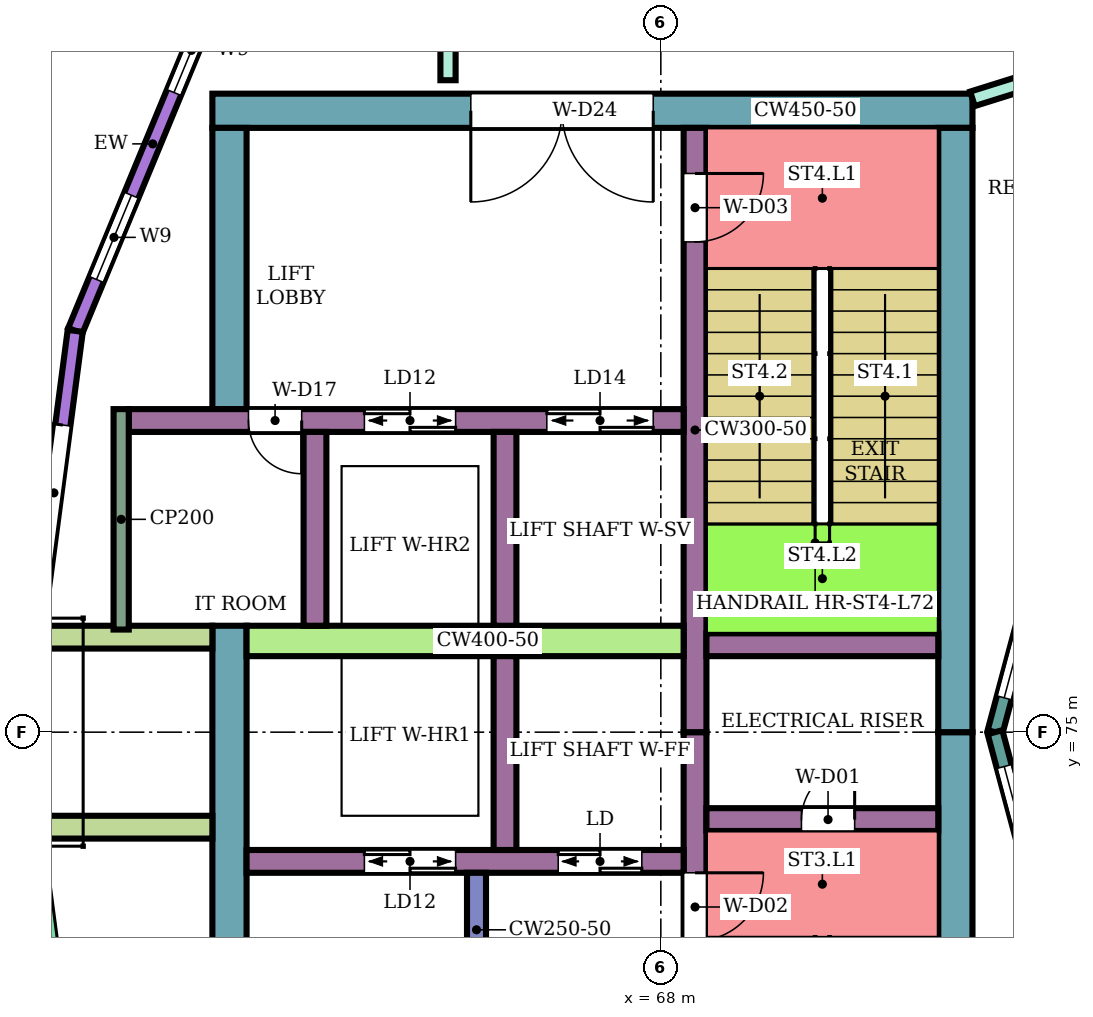
"""IFC4 building model, lengths in metres.
Left out: names, types, materials, properties, quantities, classifications, styles, units other than length and angle.
Written with IfcOpenShell. Run it as: python <this file> out.ifc"""

import sys

from ifc_helpers import new_model, si_unit, direction, frame, frame_2d, origin, place, context, subcontext, project, spatial, rectangle, extrude, element, fill, save


model = new_model("IFC4")
c1 = context("Model", 3, precision=1e-05, world=origin(), true_north=direction((0.0, 1.0)))
c2 = subcontext(c1, "Body", "Model", "MODEL_VIEW")
j1 = project(units=[si_unit("LENGTHUNIT", "METRE"), si_unit("PLANEANGLEUNIT", "RADIAN")], contexts=[c1])
p1 = place(None, origin())
s1 = spatial("IfcSite", under=j1, at=p1, CompositionType="ELEMENT")
p2 = place(p1, origin())
s2 = spatial("IfcBuilding", under=s1, at=p2, CompositionType="ELEMENT")
p3 = place(p2, frame((0.0, 0.0, 314.9)))
s3 = spatial("IfcBuildingStorey", under=s2, at=p3, CompositionType="ELEMENT", Elevation=314.9)
p4 = place(p3, frame((72.1, 83.175, 0.0), z_axis=(0.0, 0.0, 1.0), x_axis=(-1.0, 0.0, 0.0)))
e1 = element("IfcWall", 1, at=p4, inside=s3, PredefinedType="SHEAR", context=c2, shape_type="SweptSolid", body=[
    extrude(rectangle(XDim=10.0, YDim=0.45, at=frame_2d((5.0, 0.0))), origin(), (0.0, 0.0, 1.0), 4.08),
])
p5 = place(p4, frame((4.2, 0.0, 0.0)))
e2 = element("IfcOpeningElement", 2, at=p5, cuts=e1, PredefinedType="OPENING", context=c2, shape_type="SweptSolid", body=[
    extrude(rectangle(XDim=2.4, YDim=2.4, at=frame_2d((1.2, 1.2))), frame((0.0, 0.235, 0.0), z_axis=(0.0, -1.0, 0.0), x_axis=(1.0, 0.0, 0.0)), (0.0, 0.0, 1.0), 0.47),
])
for number, where, z_axis, x_axis in (
    (3, (71.875, 75.0, 0.0), (0.0, 0.0, 1.0), (0.0, -1.0, 0.0)),
    (4, (71.875, 82.95, 0.0), (0.0, 0.0, 1.0), (0.0, -1.0, 0.0)),
):
    element("IfcWall", number, at=place(p3, frame(where, z_axis=z_axis, x_axis=x_axis)), inside=s3, PredefinedType="SHEAR", context=c2, shape_type="SweptSolid", body=[
        extrude(rectangle(XDim=7.95, YDim=0.45, at=frame_2d((3.975, 0.0))), origin(), (0.0, 0.0, 1.0), 4.08),
    ])
p6 = place(p3, frame((62.325, 76.4, 0.0), z_axis=(0.0, 0.0, 1.0), x_axis=(0.0, -1.0, 0.0)))
e5 = element("IfcWall", 5, at=p6, inside=s3, PredefinedType="SHEAR", context=c2, shape_type="SweptSolid", body=[
    extrude(rectangle(XDim=9.35, YDim=0.45, at=frame_2d((4.675, 0.0))), origin(), (0.0, 0.0, 1.0), 4.08),
])
p7 = place(p3, frame((62.325, 82.95, 0.0), z_axis=(0.0, 0.0, 1.0), x_axis=(0.0, -1.0, 0.0)))
e6 = element("IfcWall", 6, at=p7, inside=s3, PredefinedType="SHEAR", context=c2, shape_type="SweptSolid", body=[
    extrude(rectangle(XDim=3.7, YDim=0.45, at=frame_2d((1.85, 0.0))), origin(), (0.0, 0.0, 1.0), 4.08),
])
p8 = place(p3, frame((68.45, 75.0, 0.0), z_axis=(0.0, 0.0, 1.0), x_axis=(0.0, -1.0, 0.0)))
e7 = element("IfcWall", 7, at=p8, inside=s3, PredefinedType="SHEAR", context=c2, shape_type="SweptSolid", body=[
    extrude(rectangle(XDim=7.95, YDim=0.3, at=frame_2d((3.975, 0.0))), origin(), (0.0, 0.0, 1.0), 4.08),
])
p9 = place(p8, frame((1.85, 0.0, 0.0)))
e8 = element("IfcOpeningElement", 8, at=p9, cuts=e7, PredefinedType="OPENING", context=c2, shape_type="SweptSolid", body=[
    extrude(rectangle(XDim=0.9, YDim=2.1, at=frame_2d((0.45, 1.05))), frame((0.0, 0.16, 0.0), z_axis=(0.0, -1.0, 0.0), x_axis=(1.0, 0.0, 0.0)), (0.0, 0.0, 1.0), 0.32),
])
p10 = place(p3, frame((68.45, 82.95, 0.0), z_axis=(0.0, 0.0, 1.0), x_axis=(0.0, -1.0, 0.0)))
e9 = element("IfcWall", 9, at=p10, inside=s3, PredefinedType="SHEAR", context=c2, shape_type="SweptSolid", body=[
    extrude(rectangle(XDim=7.95, YDim=0.3, at=frame_2d((3.975, 0.0))), origin(), (0.0, 0.0, 1.0), 4.08),
])
p11 = place(p10, frame((0.6, 0.0, 0.0)))
e10 = element("IfcOpeningElement", 10, at=p11, cuts=e9, PredefinedType="OPENING", context=c2, shape_type="SweptSolid", body=[
    extrude(rectangle(XDim=0.9, YDim=2.1, at=frame_2d((0.45, 1.05))), frame((0.0, 0.16, 0.0), z_axis=(0.0, -1.0, 0.0), x_axis=(1.0, 0.0, 0.0)), (0.0, 0.0, 1.0), 0.32),
])
p12 = place(p3, frame((71.65, 73.85, 0.0), z_axis=(0.0, 0.0, 1.0), x_axis=(-1.0, 0.0, 0.0)))
e11 = element("IfcWall", 11, at=p12, inside=s3, PredefinedType="SHEAR", context=c2, shape_type="SweptSolid", body=[
    extrude(rectangle(XDim=3.05, YDim=0.3, at=frame_2d((1.525, 0.0))), origin(), (0.0, 0.0, 1.0), 4.08),
])
p13 = place(p12, frame((1.1, 0.0, 0.0)))
e12 = element("IfcOpeningElement", 12, at=p13, cuts=e11, PredefinedType="OPENING", context=c2, shape_type="SweptSolid", body=[
    extrude(rectangle(XDim=0.7, YDim=2.0, at=frame_2d((0.35, 1.0))), frame((0.0, 0.16, 0.0), z_axis=(0.0, -1.0, 0.0), x_axis=(1.0, 0.0, 0.0)), (0.0, 0.0, 1.0), 0.32),
])
p14 = place(p3, frame((71.65, 76.15, 0.0), z_axis=(0.0, 0.0, 1.0), x_axis=(-1.0, 0.0, 0.0)))
e13 = element("IfcWall", 13, at=p14, inside=s3, PredefinedType="SHEAR", context=c2, shape_type="SweptSolid", body=[
    extrude(rectangle(XDim=3.05, YDim=0.3, at=frame_2d((1.525, 0.0))), origin(), (0.0, 0.0, 1.0), 4.08),
])
p15 = place(p3, frame((68.3, 73.3, 0.0), z_axis=(0.0, 0.0, 1.0), x_axis=(-1.0, 0.0, 0.0)))
e14 = element("IfcWall", 14, at=p15, inside=s3, PredefinedType="SHEAR", context=c2, shape_type="SweptSolid", body=[
    extrude(rectangle(XDim=5.75, YDim=0.3, at=frame_2d((2.875, 0.0))), origin(), (0.0, 0.0, 1.0), 4.08),
])
p16 = place(p15, frame((0.55, 0.0, 0.0)))
e15 = element("IfcOpeningElement", 15, at=p16, cuts=e14, PredefinedType="OPENING", context=c2, shape_type="SweptSolid", body=[
    extrude(rectangle(XDim=1.1, YDim=2.1, at=frame_2d((0.55, 1.05))), frame((0.0, 0.16, 0.0), z_axis=(0.0, -1.0, 0.0), x_axis=(1.0, 0.0, 0.0)), (0.0, 0.0, 1.0), 0.32),
])
p17 = place(p15, frame((3.0, 0.0, 0.0)))
e16 = element("IfcOpeningElement", 16, at=p17, cuts=e14, PredefinedType="OPENING", context=c2, shape_type="SweptSolid", body=[
    extrude(rectangle(XDim=1.2, YDim=2.1, at=frame_2d((0.6, 1.05))), frame((0.0, 0.16, 0.0), z_axis=(0.0, -1.0, 0.0), x_axis=(1.0, 0.0, 0.0)), (0.0, 0.0, 1.0), 0.32),
])
p18 = place(p3, frame((68.3, 76.2, 0.0), z_axis=(0.0, 0.0, 1.0), x_axis=(-1.0, 0.0, 0.0)))
e17 = element("IfcWall", 17, at=p18, inside=s3, PredefinedType="SHEAR", context=c2, shape_type="SweptSolid", body=[
    extrude(rectangle(XDim=5.75, YDim=0.4, at=frame_2d((2.875, 0.0))), origin(), (0.0, 0.0, 1.0), 4.08),
])
p19 = place(p3, frame((68.3, 79.1, 0.0), z_axis=(0.0, 0.0, 1.0), x_axis=(-1.0, 0.0, 0.0)))
e18 = element("IfcWall", 18, at=p19, inside=s3, PredefinedType="SHEAR", context=c2, shape_type="SweptSolid", body=[
    extrude(rectangle(XDim=7.3, YDim=0.3, at=frame_2d((3.65, 0.0))), origin(), (0.0, 0.0, 1.0), 4.08),
])
p20 = place(p19, frame((0.4, 0.0, 0.0)))
e19 = element("IfcOpeningElement", 19, at=p20, cuts=e18, PredefinedType="OPENING", context=c2, shape_type="SweptSolid", body=[
    extrude(rectangle(XDim=1.4, YDim=2.1, at=frame_2d((0.7, 1.05))), frame((0.0, 0.16, 0.0), z_axis=(0.0, -1.0, 0.0), x_axis=(1.0, 0.0, 0.0)), (0.0, 0.0, 1.0), 0.32),
])
p21 = place(p19, frame((3.0, 0.0, 0.0)))
e20 = element("IfcOpeningElement", 20, at=p21, cuts=e18, PredefinedType="OPENING", context=c2, shape_type="SweptSolid", body=[
    extrude(rectangle(XDim=1.2, YDim=2.1, at=frame_2d((0.6, 1.05))), frame((0.0, 0.16, 0.0), z_axis=(0.0, -1.0, 0.0), x_axis=(1.0, 0.0, 0.0)), (0.0, 0.0, 1.0), 0.32),
])
p22 = place(p19, frame((5.025, 0.0, 0.0)))
e21 = element("IfcOpeningElement", 21, at=p22, cuts=e18, PredefinedType="OPENING", context=c2, shape_type="SweptSolid", body=[
    extrude(rectangle(XDim=0.7, YDim=2.1, at=frame_2d((0.35, 1.05))), frame((0.0, 0.16, 0.0), z_axis=(0.0, -1.0, 0.0), x_axis=(1.0, 0.0, 0.0)), (0.0, 0.0, 1.0), 0.32),
])
for number, where, z_axis, x_axis in (
    (22, (65.95, 76.0, 0.0), (0.0, 0.0, 1.0), (0.0, -1.0, 0.0)),
    (23, (65.95, 78.95, 0.0), (0.0, 0.0, 1.0), (0.0, -1.0, 0.0)),
    (24, (63.45, 78.95, 0.0), (0.0, 0.0, 1.0), (0.0, -1.0, 0.0)),
):
    element("IfcWall", number, at=place(p3, frame(where, z_axis=z_axis, x_axis=x_axis)), inside=s3, PredefinedType="SHEAR", context=c2, shape_type="SweptSolid", body=[
        extrude(rectangle(XDim=2.55, YDim=0.3, at=frame_2d((1.275, 0.0))), origin(), (0.0, 0.0, 1.0), 4.08),
    ])
p23 = place(p3, frame((65.575, 73.15, 0.0), z_axis=(0.0, 0.0, 1.0), x_axis=(0.0, -1.0, 0.0)))
e25 = element("IfcWall", 25, at=p23, inside=s3, PredefinedType="SHEAR", context=c2, shape_type="SweptSolid", body=[
    extrude(rectangle(XDim=1.5, YDim=0.25, at=frame_2d((0.75, 0.0))), origin(), (0.0, 0.0, 1.0), 4.08),
])
p24 = place(p3, frame((62.334, 85.199, 0.0), z_axis=(0.0, 0.0, 1.0), x_axis=(-0.382690574388, -0.923876574156, 0.0)))
e26 = element("IfcWall", 26, at=p24, inside=s3, PredefinedType="NOTDEFINED", context=c2, shape_type="SweptSolid", body=[
    extrude(rectangle(XDim=5.325, YDim=0.2, at=frame_2d((2.663, 0.0))), origin(), (0.0, 0.0, 1.0), 4.4),
])
p25 = place(p24, frame((0.731, 0.0, 0.9)))
e27 = element("IfcOpeningElement", 27, at=p25, cuts=e26, PredefinedType="OPENING", context=c2, shape_type="SweptSolid", body=[
    extrude(rectangle(XDim=1.2, YDim=2.7, at=frame_2d((0.6, 1.35))), frame((0.0, 0.11, 0.0), z_axis=(0.0, -1.0, 0.0), x_axis=(1.0, 0.0, 0.0)), (0.0, 0.0, 1.0), 0.22),
])
p26 = place(p24, frame((3.394, 0.0, 0.9)))
e28 = element("IfcOpeningElement", 28, at=p26, cuts=e26, PredefinedType="OPENING", context=c2, shape_type="SweptSolid", body=[
    extrude(rectangle(XDim=1.2, YDim=2.7, at=frame_2d((0.6, 1.35))), frame((0.0, 0.11, 0.0), z_axis=(0.0, -1.0, 0.0), x_axis=(1.0, 0.0, 0.0)), (0.0, 0.0, 1.0), 0.22),
])
p27 = place(p3, frame((60.296, 80.28, 0.0), z_axis=(0.0, 0.0, 1.0), x_axis=(-0.130512609533, -0.991446649474, 0.0)))
e29 = element("IfcWall", 29, at=p27, inside=s3, PredefinedType="NOTDEFINED", context=c2, shape_type="SweptSolid", body=[
    extrude(rectangle(XDim=3.913, YDim=0.2, at=frame_2d((1.957, 0.0))), origin(), (0.0, 0.0, 1.0), 4.4),
])
p28 = place(p27, frame((1.25, 0.0, 0.0)))
e30 = element("IfcOpeningElement", 30, at=p28, cuts=e29, PredefinedType="OPENING", context=c2, shape_type="SweptSolid", body=[
    extrude(rectangle(XDim=1.8, YDim=2.7, at=frame_2d((0.9, 1.35))), frame((0.0, 0.11, 0.0), z_axis=(0.0, -1.0, 0.0), x_axis=(1.0, 0.0, 0.0)), (0.0, 0.0, 1.0), 0.22),
])
for number, where, z_axis, x_axis in (
    (31, (62.1, 76.25, 0.0), (0.0, 0.0, 1.0), (-1.0, 0.0, 0.0)),
    (32, (62.1, 73.75, 0.0), (0.0, 0.0, 1.0), (-1.0, 0.0, 0.0)),
):
    element("IfcWall", number, at=place(p3, frame(where, z_axis=z_axis, x_axis=x_axis)), inside=s3, PredefinedType="NOTDEFINED", context=c2, shape_type="SweptSolid", body=[
        extrude(rectangle(XDim=2.416, YDim=0.3, at=frame_2d((1.208, 0.0))), origin(), (0.0, 0.0, 1.0), 4.4),
    ])
p29 = place(p3, frame((73.415, 78.802, 0.0), z_axis=(0.0, 0.0, 1.0), x_axis=(-0.258789828301, -0.965933654434, 0.0)))
e33 = element("IfcWall", 33, at=p29, inside=s3, PredefinedType="NOTDEFINED", context=c2, shape_type="SweptSolid", body=[
    extrude(rectangle(XDim=3.936, YDim=0.2, at=frame_2d((1.968, 0.0))), origin(), (0.0, 0.0, 1.0), 4.4),
])
p30 = place(p29, frame((0.468, 0.0, 0.9)))
e34 = element("IfcOpeningElement", 34, at=p30, cuts=e33, PredefinedType="OPENING", context=c2, shape_type="SweptSolid", body=[
    extrude(rectangle(XDim=3.0, YDim=2.3, at=frame_2d((1.5, 1.15))), frame((0.0, 0.11, 0.0), z_axis=(0.0, -1.0, 0.0), x_axis=(1.0, 0.0, 0.0)), (0.0, 0.0, 1.0), 0.22),
])
p31 = place(p3, frame((72.396, 75.0, 0.0), z_axis=(0.0, 0.0, 1.0), x_axis=(0.258789828301, -0.965933654434, 0.0)))
e35 = element("IfcWall", 35, at=p31, inside=s3, PredefinedType="NOTDEFINED", context=c2, shape_type="SweptSolid", body=[
    extrude(rectangle(XDim=3.936, YDim=0.2, at=frame_2d((1.968, 0.0))), origin(), (0.0, 0.0, 1.0), 4.4),
])
p32 = place(p31, frame((0.468, 0.0, 0.9)))
e36 = element("IfcOpeningElement", 36, at=p32, cuts=e35, PredefinedType="OPENING", context=c2, shape_type="SweptSolid", body=[
    extrude(rectangle(XDim=3.0, YDim=2.3, at=frame_2d((1.5, 1.15))), frame((0.0, 0.11, 0.0), z_axis=(0.0, -1.0, 0.0), x_axis=(1.0, 0.0, 0.0)), (0.0, 0.0, 1.0), 0.22),
])
p33 = place(p3, frame((65.2, 83.577, 0.0), z_axis=(0.0, 0.0, 1.0), x_axis=(0.0, 1.0, 0.0)))
e37 = element("IfcWall", 37, at=p33, inside=s3, PredefinedType="PARTITIONING", context=c2, shape_type="SweptSolid", body=[
    extrude(rectangle(XDim=1.223, YDim=0.2, at=frame_2d((0.612, 0.0))), origin(), (0.0, 0.0, 1.0), 3.95),
])
p34 = place(p3, frame((72.1, 83.332, 0.0), z_axis=(0.0, 0.0, 1.0), x_axis=(0.954233106619, 0.299063836383, 0.0)))
e38 = element("IfcWall", 38, at=p34, inside=s3, PredefinedType="PARTITIONING", context=c2, shape_type="SweptSolid", body=[
    extrude(rectangle(XDim=2.414, YDim=0.2, at=frame_2d((1.207, 0.0))), origin(), (0.0, 0.0, 1.0), 3.95),
])
p35 = place(p34, frame((0.762, 0.0, 0.0)))
e39 = element("IfcOpeningElement", 39, at=p35, cuts=e38, PredefinedType="OPENING", context=c2, shape_type="SweptSolid", body=[
    extrude(rectangle(XDim=0.9, YDim=2.1, at=frame_2d((0.45, 1.05))), frame((0.0, 0.11, 0.0), z_axis=(0.0, -1.0, 0.0), x_axis=(1.0, 0.0, 0.0)), (0.0, 0.0, 1.0), 0.22),
])
p36 = place(p3, frame((60.9, 79.25, 0.0), z_axis=(0.0, 0.0, 1.0), x_axis=(0.0, -1.0, 0.0)))
e40 = element("IfcWall", 40, at=p36, inside=s3, PredefinedType="PARTITIONING", context=c2, shape_type="SweptSolid", body=[
    extrude(rectangle(XDim=2.9, YDim=0.2, at=frame_2d((1.45, 0.0))), origin(), (0.0, 0.0, 1.0), 4.08),
])
p37 = place(p25, origin())
e41 = element("IfcWindow", 41, at=p37, inside=s3, PartitioningType="SINGLE_PANEL", PredefinedType="WINDOW", context=c2, shape_type="SweptSolid", body=[
    extrude(rectangle(XDim=1.2, YDim=2.7, at=frame_2d((0.6, 1.35))), frame((0.0, 0.03, 0.0), z_axis=(0.0, -1.0, 0.0), x_axis=(1.0, 0.0, 0.0)), (0.0, 0.0, 1.0), 0.06),
])
fill(e27, e41)
p38 = place(p26, origin())
e42 = element("IfcWindow", 42, at=p38, inside=s3, PartitioningType="SINGLE_PANEL", PredefinedType="WINDOW", context=c2, shape_type="SweptSolid", body=[
    extrude(rectangle(XDim=1.2, YDim=2.7, at=frame_2d((0.6, 1.35))), frame((0.0, 0.03, 0.0), z_axis=(0.0, -1.0, 0.0), x_axis=(1.0, 0.0, 0.0)), (0.0, 0.0, 1.0), 0.06),
])
fill(e28, e42)
p39 = place(p28, frame((1.8, 0.0, 0.0), z_axis=(0.0, 0.0, 1.0), x_axis=(-1.0, 0.0, 0.0)))
e43 = element("IfcDoor", 43, at=p39, inside=s3, OperationType="DOUBLE_DOOR_SINGLE_SWING", PredefinedType="DOOR", context=c2, shape_type="SweptSolid", body=[
    extrude(rectangle(XDim=1.8, YDim=2.7, at=frame_2d((0.9, 1.35))), frame((0.0, 0.025, 0.0), z_axis=(0.0, -1.0, 0.0), x_axis=(1.0, 0.0, 0.0)), (0.0, 0.0, 1.0), 0.05),
])
fill(e30, e43)
p40 = place(p30, origin())
e44 = element("IfcWindow", 44, at=p40, inside=s3, PartitioningType="SINGLE_PANEL", PredefinedType="WINDOW", context=c2, shape_type="SweptSolid", body=[
    extrude(rectangle(XDim=3.0, YDim=2.3, at=frame_2d((1.5, 1.15))), frame((0.0, 0.03, 0.0), z_axis=(0.0, -1.0, 0.0), x_axis=(1.0, 0.0, 0.0)), (0.0, 0.0, 1.0), 0.06),
])
fill(e34, e44)
p41 = place(p32, origin())
e45 = element("IfcWindow", 45, at=p41, inside=s3, PartitioningType="SINGLE_PANEL", PredefinedType="WINDOW", context=c2, shape_type="SweptSolid", body=[
    extrude(rectangle(XDim=3.0, YDim=2.3, at=frame_2d((1.5, 1.15))), frame((0.0, 0.03, 0.0), z_axis=(0.0, -1.0, 0.0), x_axis=(1.0, 0.0, 0.0)), (0.0, 0.0, 1.0), 0.06),
])
fill(e36, e45)
p42 = place(p13, frame((0.7, 0.0, 0.0), z_axis=(0.0, 0.0, 1.0), x_axis=(-1.0, 0.0, 0.0)))
e46 = element("IfcDoor", 46, at=p42, inside=s3, OperationType="SINGLE_SWING_RIGHT", PredefinedType="DOOR", context=c2, shape_type="SweptSolid", body=[
    extrude(rectangle(XDim=0.7, YDim=2.0, at=frame_2d((0.35, 1.0))), frame((0.0, 0.025, 0.0), z_axis=(0.0, -1.0, 0.0), x_axis=(1.0, 0.0, 0.0)), (0.0, 0.0, 1.0), 0.05),
])
fill(e12, e46)
p43 = place(p9, origin())
e47 = element("IfcDoor", 47, at=p43, inside=s3, OperationType="SINGLE_SWING_LEFT", PredefinedType="DOOR", context=c2, shape_type="SweptSolid", body=[
    extrude(rectangle(XDim=0.9, YDim=2.1, at=frame_2d((0.45, 1.05))), frame((0.0, 0.025, 0.0), z_axis=(0.0, -1.0, 0.0), x_axis=(1.0, 0.0, 0.0)), (0.0, 0.0, 1.0), 0.05),
])
fill(e8, e47)
p44 = place(p11, origin())
e48 = element("IfcDoor", 48, at=p44, inside=s3, OperationType="SINGLE_SWING_LEFT", PredefinedType="DOOR", context=c2, shape_type="SweptSolid", body=[
    extrude(rectangle(XDim=0.9, YDim=2.1, at=frame_2d((0.45, 1.05))), frame((0.0, 0.025, 0.0), z_axis=(0.0, -1.0, 0.0), x_axis=(1.0, 0.0, 0.0)), (0.0, 0.0, 1.0), 0.05),
])
fill(e10, e48)
p45 = place(p16, origin())
e49 = element("IfcDoor", 49, at=p45, inside=s3, OperationType="DOUBLE_DOOR_SLIDING", PredefinedType="DOOR", context=c2, shape_type="SweptSolid", body=[
    extrude(rectangle(XDim=1.1, YDim=2.1, at=frame_2d((0.55, 1.05))), frame((0.0, 0.025, 0.0), z_axis=(0.0, -1.0, 0.0), x_axis=(1.0, 0.0, 0.0)), (0.0, 0.0, 1.0), 0.05),
])
fill(e15, e49)
p46 = place(p17, origin())
e50 = element("IfcDoor", 50, at=p46, inside=s3, OperationType="DOUBLE_DOOR_SLIDING", PredefinedType="DOOR", context=c2, shape_type="SweptSolid", body=[
    extrude(rectangle(XDim=1.2, YDim=2.1, at=frame_2d((0.6, 1.05))), frame((0.0, 0.025, 0.0), z_axis=(0.0, -1.0, 0.0), x_axis=(1.0, 0.0, 0.0)), (0.0, 0.0, 1.0), 0.05),
])
fill(e16, e50)
p47 = place(p20, origin())
e51 = element("IfcDoor", 51, at=p47, inside=s3, OperationType="DOUBLE_DOOR_SLIDING", PredefinedType="DOOR", context=c2, shape_type="SweptSolid", body=[
    extrude(rectangle(XDim=1.4, YDim=2.1, at=frame_2d((0.7, 1.05))), frame((0.0, 0.025, 0.0), z_axis=(0.0, -1.0, 0.0), x_axis=(1.0, 0.0, 0.0)), (0.0, 0.0, 1.0), 0.05),
])
fill(e19, e51)
p48 = place(p21, origin())
e52 = element("IfcDoor", 52, at=p48, inside=s3, OperationType="DOUBLE_DOOR_SLIDING", PredefinedType="DOOR", context=c2, shape_type="SweptSolid", body=[
    extrude(rectangle(XDim=1.2, YDim=2.1, at=frame_2d((0.6, 1.05))), frame((0.0, 0.025, 0.0), z_axis=(0.0, -1.0, 0.0), x_axis=(1.0, 0.0, 0.0)), (0.0, 0.0, 1.0), 0.05),
])
fill(e20, e52)
p49 = place(p22, origin())
e53 = element("IfcDoor", 53, at=p49, inside=s3, OperationType="SINGLE_SWING_LEFT", PredefinedType="DOOR", context=c2, shape_type="SweptSolid", body=[
    extrude(rectangle(XDim=0.7, YDim=2.1, at=frame_2d((0.35, 1.05))), frame((0.0, 0.025, 0.0), z_axis=(0.0, -1.0, 0.0), x_axis=(1.0, 0.0, 0.0)), (0.0, 0.0, 1.0), 0.05),
])
fill(e21, e53)
p50 = place(p5, origin())
e54 = element("IfcDoor", 54, at=p50, inside=s3, OperationType="DOUBLE_DOOR_SINGLE_SWING", PredefinedType="DOOR", context=c2, shape_type="SweptSolid", body=[
    extrude(rectangle(XDim=2.4, YDim=2.4, at=frame_2d((1.2, 1.2))), frame((0.0, 0.025, 0.0), z_axis=(0.0, -1.0, 0.0), x_axis=(1.0, 0.0, 0.0)), (0.0, 0.0, 1.0), 0.05),
])
fill(e2, e54)
save(model, sys.argv[1])
